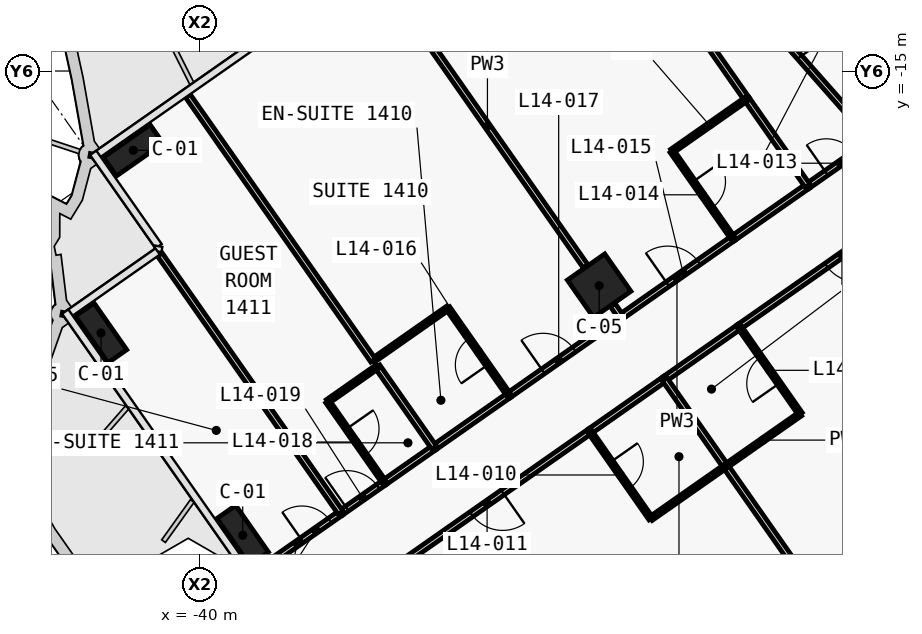
"""IFC4 building model, lengths in metres.
Left out: names, types, materials, properties, quantities, classifications, styles, units other than length and angle.
Written with IfcOpenShell. Run it as: python <this file> out.ifc"""

import sys

from ifc_helpers import new_model, si_unit, direction, frame, frame_2d, origin, origin_2d, place, context, subcontext, project, spatial, polyline, rectangle, outline, extrude, element, fill, save


model = new_model("IFC4")
c1 = context("Model", 3, precision=1e-05, world=origin(), true_north=direction((0.0, 1.0)))
c2 = subcontext(c1, "Body", "Model", "MODEL_VIEW")
j1 = project(units=[si_unit("LENGTHUNIT", "METRE"), si_unit("PLANEANGLEUNIT", "RADIAN")], contexts=[c1])
p1 = place(None, origin())
s1 = spatial("IfcSite", under=j1, at=p1, CompositionType="ELEMENT")
p2 = place(p1, origin())
s2 = spatial("IfcBuilding", under=s1, at=p2, CompositionType="ELEMENT")
p3 = place(p2, frame((0.0, 0.0, 76.1)))
s3 = spatial("IfcBuildingStorey", under=s2, at=p3, CompositionType="ELEMENT", Elevation=76.1)
p4 = place(p3, frame((-21.708, -15.2, 0.0), z_axis=(0.0, 0.0, 1.0), x_axis=(-0.573576324356, 0.819152122709, 0.0)))
e1 = element("IfcWall", 1, at=p4, inside=s3, PredefinedType="SHEAR", context=c2, shape_type="SweptSolid", body=[
    extrude(outline(polyline([(0.0, 0.5), (0.0, -0.5), (9.2, -0.5), (9.2, 0.5), (0.0, 0.5)])), origin(), (0.0, 0.0, 1.0), 3.6),
])
p5 = place(p4, frame((6.1, 0.0, 0.0)))
e2 = element("IfcOpeningElement", 2, at=p5, cuts=e1, PredefinedType="OPENING", context=c2, shape_type="SweptSolid", body=[
    extrude(rectangle(XDim=1.8, YDim=2.1, at=frame_2d((0.9, 1.05))), frame((0.0, 0.51, 0.0), z_axis=(0.0, -1.0, 0.0), x_axis=(1.0, 0.0, 0.0)), (0.0, 0.0, 1.0), 1.02),
])
p6 = place(p4, frame((1.9, 0.0, 0.0)))
e3 = element("IfcOpeningElement", 3, at=p6, cuts=e1, PredefinedType="OPENING", context=c2, shape_type="SweptSolid", body=[
    extrude(rectangle(XDim=1.8, YDim=2.1, at=frame_2d((0.9, 1.05))), frame((0.0, 0.51, 0.0), z_axis=(0.0, -1.0, 0.0), x_axis=(1.0, 0.0, 0.0)), (0.0, 0.0, 1.0), 1.02),
])
for number, where, z_axis, x_axis in (
    (4, (-41.75, -17.087, 0.0), (0.0, 0.0, 1.0), (-0.819, -0.574, 0.0)),
    (5, (-38.869, -27.216, 0.0), (0.0, 0.0, 1.0), (-0.574, 0.819, 0.0)),
    (6, (-42.597, -21.892, 0.0), (0.0, 0.0, 1.0), (-0.574, 0.819, 0.0)),
):
    element("IfcColumn", number, at=place(p3, frame(where, z_axis=z_axis, x_axis=x_axis)), inside=s3, PredefinedType="COLUMN", context=c2, shape_type="SweptSolid", body=[
        extrude(rectangle(XDim=1.5, YDim=0.6, at=origin_2d()), origin(), (0.0, 0.0, 1.0), 3.6),
    ])
p7 = place(p3, frame((-29.49, -20.649, 0.0), z_axis=(0.0, 0.0, 1.0), x_axis=(-0.819152044289, -0.573576436351, 0.0)))
e7 = element("IfcColumn", 7, at=p7, inside=s3, PredefinedType="COLUMN", context=c2, shape_type="SweptSolid", body=[
    extrude(rectangle(XDim=1.2, YDim=1.2, at=origin_2d()), origin(), (0.0, 0.0, 1.0), 3.6),
])
p8 = place(p3, frame((-24.003, -18.028, 0.0), z_axis=(0.0, 0.0, 1.0), x_axis=(0.819160859995, 0.573563846013, 0.0)))
e8 = element("IfcWall", 8, at=p8, inside=s3, PredefinedType="PARTITIONING", context=c2, shape_type="SweptSolid", body=[
    extrude(rectangle(XDim=2.098, YDim=0.15, at=frame_2d((1.049, 0.0))), origin(), (0.0, 0.0, 1.0), 3.32),
])
p9 = place(p8, frame((0.599, 0.0, 0.0)))
e9 = element("IfcOpeningElement", 9, at=p9, cuts=e8, PredefinedType="OPENING", context=c2, shape_type="SweptSolid", body=[
    extrude(rectangle(XDim=0.9, YDim=2.1, at=frame_2d((0.45, 1.05))), frame((0.0, 0.085, 0.0), z_axis=(0.0, -1.0, 0.0), x_axis=(1.0, 0.0, 0.0)), (0.0, 0.0, 1.0), 0.17),
])
p10 = place(p3, frame((-28.917, -21.469, 0.0), z_axis=(0.0, 0.0, 1.0), x_axis=(0.81917779803, 0.57353965444, 0.0)))
e10 = element("IfcWall", 10, at=p10, inside=s3, PredefinedType="PARTITIONING", context=c2, shape_type="SweptSolid", body=[
    extrude(rectangle(XDim=3.603, YDim=0.15, at=frame_2d((1.801, 0.0))), origin(), (0.0, 0.0, 1.0), 2.6),
])
p11 = place(p10, frame((1.502, 0.0, 0.0)))
e11 = element("IfcOpeningElement", 11, at=p11, cuts=e10, PredefinedType="OPENING", context=c2, shape_type="SweptSolid", body=[
    extrude(rectangle(XDim=1.0, YDim=2.1, at=frame_2d((0.5, 1.05))), frame((0.0, 0.085, 0.0), z_axis=(0.0, -1.0, 0.0), x_axis=(1.0, 0.0, 0.0)), (0.0, 0.0, 1.0), 0.17),
])
p12 = place(p3, frame((-25.969, -19.404, 0.0), z_axis=(0.0, 0.0, 1.0), x_axis=(0.819146032251, 0.573585022335, 0.0)))
e12 = element("IfcWall", 12, at=p12, inside=s3, PredefinedType="PARTITIONING", context=c2, shape_type="SweptSolid", body=[
    extrude(rectangle(XDim=2.404, YDim=0.15, at=frame_2d((1.202, 0.0))), origin(), (0.0, 0.0, 1.0), 3.32),
])
p13 = place(p3, frame((-31.866, -23.533, 0.0), z_axis=(0.0, 0.0, 1.0), x_axis=(0.819145961204, 0.573585123798, 0.0)))
e13 = element("IfcWall", 13, at=p13, inside=s3, PredefinedType="PARTITIONING", context=c2, shape_type="SweptSolid", body=[
    extrude(rectangle(XDim=3.603, YDim=0.15, at=frame_2d((1.802, 0.0))), origin(), (0.0, 0.0, 1.0), 2.6),
])
p14 = place(p13, frame((1.101, 0.0, 0.0)))
e14 = element("IfcOpeningElement", 14, at=p14, cuts=e13, PredefinedType="OPENING", context=c2, shape_type="SweptSolid", body=[
    extrude(rectangle(XDim=1.0, YDim=2.1, at=frame_2d((0.5, 1.05))), frame((0.0, 0.085, 0.0), z_axis=(0.0, -1.0, 0.0), x_axis=(1.0, 0.0, 0.0)), (0.0, 0.0, 1.0), 0.17),
])
p15 = place(p3, frame((-33.833, -24.91, 0.0), z_axis=(0.0, 0.0, 1.0), x_axis=(0.819146032251, 0.573585022335, 0.0)))
e15 = element("IfcWall", 15, at=p15, inside=s3, PredefinedType="PARTITIONING", context=c2, shape_type="SweptSolid", body=[
    extrude(rectangle(XDim=2.404, YDim=0.15, at=frame_2d((1.202, 0.0))), origin(), (0.0, 0.0, 1.0), 3.32),
])
p16 = place(p3, frame((-36.29, -26.631, 0.0), z_axis=(0.0, 0.0, 1.0), x_axis=(0.81914197737, 0.573590813132, 0.0)))
e16 = element("IfcWall", 16, at=p16, inside=s3, PredefinedType="PARTITIONING", context=c2, shape_type="SweptSolid", body=[
    extrude(rectangle(XDim=1.403, YDim=0.15, at=frame_2d((0.701, 0.0))), origin(), (0.0, 0.0, 1.0), 3.32),
])
p17 = place(p16, frame((0.202, 0.0, 0.0)))
e17 = element("IfcOpeningElement", 17, at=p17, cuts=e16, PredefinedType="OPENING", context=c2, shape_type="SweptSolid", body=[
    extrude(rectangle(XDim=1.0, YDim=2.1, at=frame_2d((0.5, 1.05))), frame((0.0, 0.085, 0.0), z_axis=(0.0, -1.0, 0.0), x_axis=(1.0, 0.0, 0.0)), (0.0, 0.0, 1.0), 0.17),
])
p18 = place(p3, frame((-35.143, -25.828, 0.0), z_axis=(0.0, 0.0, 1.0), x_axis=(0.819189013667, 0.573523634986, 0.0)))
e18 = element("IfcWall", 18, at=p18, inside=s3, PredefinedType="PARTITIONING", context=c2, shape_type="SweptSolid", body=[
    extrude(rectangle(XDim=1.604, YDim=0.15, at=frame_2d((0.802, 0.0))), origin(), (0.0, 0.0, 1.0), 3.32),
])
p19 = place(p3, frame((-38.582, -28.236, 0.0), z_axis=(0.0, 0.0, 1.0), x_axis=(0.819137759006, 0.573596837309, 0.0)))
e19 = element("IfcWall", 19, at=p19, inside=s3, PredefinedType="PARTITIONING", context=c2, shape_type="SweptSolid", body=[
    extrude(rectangle(XDim=2.802, YDim=0.15, at=frame_2d((1.401, 0.0))), origin(), (0.0, 0.0, 1.0), 2.5),
])
p20 = place(p19, frame((1.551, 0.0, 0.0)))
e20 = element("IfcOpeningElement", 20, at=p20, cuts=e19, PredefinedType="OPENING", context=c2, shape_type="SweptSolid", body=[
    extrude(rectangle(XDim=0.9, YDim=2.1, at=frame_2d((0.45, 1.05))), frame((0.0, 0.085, 0.0), z_axis=(0.0, -1.0, 0.0), x_axis=(1.0, 0.0, 0.0)), (0.0, 0.0, 1.0), 0.17),
])
p21 = place(p3, frame((-20.395, -17.943, 0.0), z_axis=(0.0, 0.0, 1.0), x_axis=(-0.819153746897, -0.573574004767, 0.0)))
e21 = element("IfcWall", 21, at=p21, inside=s3, PredefinedType="PARTITIONING", context=c2, shape_type="SweptSolid", body=[
    extrude(rectangle(XDim=6.603, YDim=0.15, at=frame_2d((3.302, 0.0))), origin(), (0.0, 0.0, 1.0), 2.6),
])
p22 = place(p21, frame((2.802, 0.0, 0.0)))
e22 = element("IfcOpeningElement", 22, at=p22, cuts=e21, PredefinedType="OPENING", context=c2, shape_type="SweptSolid", body=[
    extrude(rectangle(XDim=1.0, YDim=2.1, at=frame_2d((0.5, 1.05))), frame((0.0, 0.085, 0.0), z_axis=(0.0, -1.0, 0.0), x_axis=(1.0, 0.0, 0.0)), (0.0, 0.0, 1.0), 0.17),
])
p23 = place(p3, frame((-25.801, -21.729, 0.0), z_axis=(0.0, 0.0, 1.0), x_axis=(-0.819179439794, -0.573537309527, 0.0)))
e23 = element("IfcWall", 23, at=p23, inside=s3, PredefinedType="PARTITIONING", context=c2, shape_type="SweptSolid", body=[
    extrude(rectangle(XDim=2.404, YDim=0.15, at=frame_2d((1.202, 0.0))), origin(), (0.0, 0.0, 1.0), 2.6),
])
p24 = place(p3, frame((-29.734, -24.482, 0.0), z_axis=(0.0, 0.0, 1.0), x_axis=(-0.819153746897, -0.573574004767, 0.0)))
e24 = element("IfcWall", 24, at=p24, inside=s3, PredefinedType="PARTITIONING", context=c2, shape_type="SweptSolid", body=[
    extrude(rectangle(XDim=6.603, YDim=0.15, at=frame_2d((3.302, 0.0))), origin(), (0.0, 0.0, 1.0), 3.32),
])
p25 = place(p24, frame((2.801, 0.0, 0.0)))
e25 = element("IfcOpeningElement", 25, at=p25, cuts=e24, PredefinedType="OPENING", context=c2, shape_type="SweptSolid", body=[
    extrude(rectangle(XDim=1.0, YDim=2.1, at=frame_2d((0.5, 1.05))), frame((0.0, 0.085, 0.0), z_axis=(0.0, -1.0, 0.0), x_axis=(1.0, 0.0, 0.0)), (0.0, 0.0, 1.0), 0.17),
])
p26 = place(p3, frame((-27.767, -23.105, 0.0), z_axis=(0.0, 0.0, 1.0), x_axis=(-0.819146032251, -0.573585022335, 0.0)))
e26 = element("IfcWall", 26, at=p26, inside=s3, PredefinedType="PARTITIONING", context=c2, shape_type="SweptSolid", body=[
    extrude(rectangle(XDim=2.404, YDim=0.15, at=frame_2d((1.202, 0.0))), origin(), (0.0, 0.0, 1.0), 2.6),
])
p27 = place(p3, frame((-22.284, -16.827, 0.0), z_axis=(0.0, 0.0, 1.0), x_axis=(-0.661545117561, 0.749905365651, 0.0)))
e27 = element("IfcWall", 27, at=p27, inside=s3, PredefinedType="PARTITIONING", context=c2, shape_type="SweptSolid", body=[
    extrude(rectangle(XDim=6.543, YDim=0.15, at=frame_2d((3.271, 0.0))), origin(), (0.0, 0.0, 1.0), 2.6),
])
p28 = place(p3, frame((-25.606, -15.734, 0.0), z_axis=(0.0, 0.0, 1.0), x_axis=(-0.573576058406, 0.819152308929, 0.0)))
e28 = element("IfcWall", 28, at=p28, inside=s3, PredefinedType="PARTITIONING", context=c2, shape_type="SweptSolid", body=[
    extrude(rectangle(XDim=8.501, YDim=0.15, at=frame_2d((4.25, 0.0))), origin(), (0.0, 0.0, 1.0), 2.6),
])
p29 = place(p3, frame((-24.001, -18.026, 0.0), z_axis=(0.0, 0.0, 1.0), x_axis=(-0.573596837309, 0.819137759006, 0.0)))
e29 = element("IfcWall", 29, at=p29, inside=s3, PredefinedType="PARTITIONING", context=c2, shape_type="SweptSolid", body=[
    extrude(rectangle(XDim=2.802, YDim=0.15, at=frame_2d((1.401, 0.0))), origin(), (0.0, 0.0, 1.0), 2.6),
])
p30 = place(p3, frame((-25.608, -15.732, 0.0), z_axis=(0.0, 0.0, 1.0), x_axis=(-0.819107643868, -0.573639841501, 0.0)))
e30 = element("IfcWall", 30, at=p30, inside=s3, PredefinedType="PARTITIONING", context=c2, shape_type="SweptSolid", body=[
    extrude(rectangle(XDim=2.4, YDim=0.12, at=frame_2d((1.2, 0.0))), origin(), (0.0, 0.0, 1.0), 3.32),
])
p31 = place(p3, frame((-27.574, -17.11, 0.0), z_axis=(0.0, 0.0, 1.0), x_axis=(0.573591086599, -0.819141785879, 0.0)))
e31 = element("IfcWall", 31, at=p31, inside=s3, PredefinedType="PARTITIONING", context=c2, shape_type="SweptSolid", body=[
    extrude(rectangle(XDim=2.8, YDim=0.12, at=frame_2d((1.4, 0.0))), origin(), (0.0, 0.0, 1.0), 2.6),
])
p32 = place(p31, frame((0.975, 0.0, 0.0)))
e32 = element("IfcOpeningElement", 32, at=p32, cuts=e31, PredefinedType="OPENING", context=c2, shape_type="SweptSolid", body=[
    extrude(rectangle(XDim=0.85, YDim=2.05, at=frame_2d((0.425, 1.025))), frame((0.0, 0.07, 0.0), z_axis=(0.0, -1.0, 0.0), x_axis=(1.0, 0.0, 0.0)), (0.0, 0.0, 1.0), 0.14),
])
p33 = place(p3, frame((-28.916, -21.468, 0.0), z_axis=(0.0, 0.0, 1.0), x_axis=(-0.572944929411, 0.819593867633, 0.0)))
e33 = element("IfcWall", 33, at=p33, inside=s3, PredefinedType="PARTITIONING", context=c2, shape_type="SweptSolid", body=[
    extrude(rectangle(XDim=0.38, YDim=0.15, at=frame_2d((0.19, 0.0))), origin(), (0.0, 0.0, 1.0), 2.6),
])
p34 = place(p3, frame((-29.845, -20.141, 0.0), z_axis=(0.0, 0.0, 1.0), x_axis=(-0.573558725113, 0.819164445546, 0.0)))
e34 = element("IfcWall", 34, at=p34, inside=s3, PredefinedType="PARTITIONING", context=c2, shape_type="SweptSolid", body=[
    extrude(rectangle(XDim=9.01, YDim=0.15, at=frame_2d((4.505, 0.0))), origin(), (0.0, 0.0, 1.0), 2.6),
])
p35 = place(p3, frame((-31.864, -23.532, 0.0), z_axis=(0.0, 0.0, 1.0), x_axis=(-0.573550118428, 0.819170471667, 0.0)))
e35 = element("IfcWall", 35, at=p35, inside=s3, PredefinedType="PARTITIONING", context=c2, shape_type="SweptSolid", body=[
    extrude(rectangle(XDim=2.8, YDim=0.12, at=frame_2d((1.4, 0.0))), origin(), (0.0, 0.0, 1.0), 2.6),
])
p36 = place(p35, frame((0.975, 0.0, 0.0)))
e36 = element("IfcOpeningElement", 36, at=p36, cuts=e35, PredefinedType="OPENING", context=c2, shape_type="SweptSolid", body=[
    extrude(rectangle(XDim=0.85, YDim=2.05, at=frame_2d((0.425, 1.025))), frame((0.0, 0.07, 0.0), z_axis=(0.0, -1.0, 0.0), x_axis=(1.0, 0.0, 0.0)), (0.0, 0.0, 1.0), 0.14),
])
p37 = place(p3, frame((-33.471, -21.238, 0.0), z_axis=(0.0, 0.0, 1.0), x_axis=(-0.819141114317, -0.573592045652, 0.0)))
e37 = element("IfcWall", 37, at=p37, inside=s3, PredefinedType="PARTITIONING", context=c2, shape_type="SweptSolid", body=[
    extrude(rectangle(XDim=2.4, YDim=0.12, at=frame_2d((1.2, 0.0))), origin(), (0.0, 0.0, 1.0), 3.32),
])
p38 = place(p3, frame((-35.438, -22.615, 0.0), z_axis=(0.0, 0.0, 1.0), x_axis=(-0.573560662175, 0.81916308926, 0.0)))
e38 = element("IfcWall", 38, at=p38, inside=s3, PredefinedType="PARTITIONING", context=c2, shape_type="SweptSolid", body=[
    extrude(rectangle(XDim=8.499, YDim=0.15, at=frame_2d((4.25, 0.0))), origin(), (0.0, 0.0, 1.0), 2.5),
])
p39 = place(p3, frame((-33.831, -24.909, 0.0), z_axis=(0.0, 0.0, 1.0), x_axis=(-0.573544201094, 0.819174614714, 0.0)))
e39 = element("IfcWall", 39, at=p39, inside=s3, PredefinedType="PARTITIONING", context=c2, shape_type="SweptSolid", body=[
    extrude(rectangle(XDim=2.602, YDim=0.15, at=frame_2d((1.301, 0.0))), origin(), (0.0, 0.0, 1.0), 2.6),
])
p40 = place(p3, frame((-35.323, -22.779, 0.0), z_axis=(0.0, 0.0, 1.0), x_axis=(-0.819131543282, -0.57360571371, 0.0)))
e40 = element("IfcWall", 40, at=p40, inside=s3, PredefinedType="PARTITIONING", context=c2, shape_type="SweptSolid", body=[
    extrude(rectangle(XDim=1.6, YDim=0.12, at=frame_2d((0.8, 0.0))), origin(), (0.0, 0.0, 1.0), 3.32),
])
p41 = place(p3, frame((-36.634, -23.698, 0.0), z_axis=(0.0, 0.0, 1.0), x_axis=(0.573582085028, -0.819148089014, 0.0)))
e41 = element("IfcWall", 41, at=p41, inside=s3, PredefinedType="PARTITIONING", context=c2, shape_type="SweptSolid", body=[
    extrude(rectangle(XDim=2.6, YDim=0.12, at=frame_2d((1.3, 0.0))), origin(), (0.0, 0.0, 1.0), 2.6),
])
p42 = place(p41, frame((0.875, 0.0, 0.0)))
e42 = element("IfcOpeningElement", 42, at=p42, cuts=e41, PredefinedType="OPENING", context=c2, shape_type="SweptSolid", body=[
    extrude(rectangle(XDim=0.85, YDim=2.05, at=frame_2d((0.425, 1.025))), frame((0.0, 0.07, 0.0), z_axis=(0.0, -1.0, 0.0), x_axis=(1.0, 0.0, 0.0)), (0.0, 0.0, 1.0), 0.14),
])
p43 = place(p3, frame((-36.288, -26.63, 0.0), z_axis=(0.0, 0.0, 1.0), x_axis=(-0.573555124968, 0.819166966267, 0.0)))
e43 = element("IfcWall", 43, at=p43, inside=s3, PredefinedType="PARTITIONING", context=c2, shape_type="SweptSolid", body=[
    extrude(rectangle(XDim=8.3, YDim=0.15, at=frame_2d((4.15, 0.0))), origin(), (0.0, 0.0, 1.0), 2.6),
])
p44 = place(p3, frame((-26.162, -25.401, 0.0), z_axis=(0.0, 0.0, 1.0), x_axis=(0.819155442668, 0.573571582932, 0.0)))
e44 = element("IfcWall", 44, at=p44, inside=s3, PredefinedType="PARTITIONING", context=c2, shape_type="SweptSolid", body=[
    extrude(rectangle(XDim=2.4, YDim=0.12, at=frame_2d((1.2, 0.0))), origin(), (0.0, 0.0, 1.0), 2.6),
])
p45 = place(p3, frame((-24.196, -24.023, 0.0), z_axis=(0.0, 0.0, 1.0), x_axis=(-0.573608623498, 0.819129505664, 0.0)))
e45 = element("IfcWall", 45, at=p45, inside=s3, PredefinedType="PARTITIONING", context=c2, shape_type="SweptSolid", body=[
    extrude(rectangle(XDim=2.8, YDim=0.12, at=frame_2d((1.4, 0.0))), origin(), (0.0, 0.0, 1.0), 3.32),
])
p46 = place(p45, frame((0.975, 0.0, 0.0)))
e46 = element("IfcOpeningElement", 46, at=p46, cuts=e45, PredefinedType="OPENING", context=c2, shape_type="SweptSolid", body=[
    extrude(rectangle(XDim=0.85, YDim=2.05, at=frame_2d((0.425, 1.025))), frame((0.0, 0.07, 0.0), z_axis=(0.0, -1.0, 0.0), x_axis=(1.0, 0.0, 0.0)), (0.0, 0.0, 1.0), 0.14),
])
p47 = place(p3, frame((-23.966, -28.537, 0.0), z_axis=(0.0, 0.0, 1.0), x_axis=(-0.573594994199, 0.819139049631, 0.0)))
e47 = element("IfcWall", 47, at=p47, inside=s3, PredefinedType="PARTITIONING", context=c2, shape_type="SweptSolid", body=[
    extrude(rectangle(XDim=3.829, YDim=0.15, at=frame_2d((1.915, 0.0))), origin(), (0.0, 0.0, 1.0), 2.6),
])
p48 = place(p3, frame((-26.163, -25.4, 0.0), z_axis=(0.0, 0.0, 1.0), x_axis=(-0.573608623498, 0.819129505664, 0.0)))
e48 = element("IfcWall", 48, at=p48, inside=s3, PredefinedType="PARTITIONING", context=c2, shape_type="SweptSolid", body=[
    extrude(rectangle(XDim=2.8, YDim=0.15, at=frame_2d((1.4, 0.0))), origin(), (0.0, 0.0, 1.0), 2.6),
])
p49 = place(p3, frame((-29.736, -24.483, 0.0), z_axis=(0.0, 0.0, 1.0), x_axis=(0.573608623498, -0.819129505664, 0.0)))
e49 = element("IfcWall", 49, at=p49, inside=s3, PredefinedType="PARTITIONING", context=c2, shape_type="SweptSolid", body=[
    extrude(rectangle(XDim=2.8, YDim=0.12, at=frame_2d((1.4, 0.0))), origin(), (0.0, 0.0, 1.0), 3.32),
])
p50 = place(p49, frame((0.975, 0.0, 0.0)))
e50 = element("IfcOpeningElement", 50, at=p50, cuts=e49, PredefinedType="OPENING", context=c2, shape_type="SweptSolid", body=[
    extrude(rectangle(XDim=0.85, YDim=2.05, at=frame_2d((0.425, 1.025))), frame((0.0, 0.07, 0.0), z_axis=(0.0, -1.0, 0.0), x_axis=(1.0, 0.0, 0.0)), (0.0, 0.0, 1.0), 0.14),
])
p51 = place(p3, frame((-28.128, -26.777, 0.0), z_axis=(0.0, 0.0, 1.0), x_axis=(0.819188907105, 0.573523787192, 0.0)))
e51 = element("IfcWall", 51, at=p51, inside=s3, PredefinedType="PARTITIONING", context=c2, shape_type="SweptSolid", body=[
    extrude(rectangle(XDim=2.4, YDim=0.12, at=frame_2d((1.2, 0.0))), origin(), (0.0, 0.0, 1.0), 2.6),
])
p52 = place(p46, origin())
e52 = element("IfcDoor", 52, at=p52, inside=s3, OperationType="SINGLE_SWING_RIGHT", PredefinedType="DOOR", context=c2, shape_type="SweptSolid", body=[
    extrude(rectangle(XDim=0.85, YDim=2.05, at=frame_2d((0.425, 1.025))), frame((0.0, 0.025, 0.0), z_axis=(0.0, -1.0, 0.0), x_axis=(1.0, 0.0, 0.0)), (0.0, 0.0, 1.0), 0.05),
])
fill(e46, e52)
p53 = place(p22, origin())
e53 = element("IfcDoor", 53, at=p53, inside=s3, OperationType="SINGLE_SWING_RIGHT", PredefinedType="DOOR", context=c2, shape_type="SweptSolid", body=[
    extrude(rectangle(XDim=1.0, YDim=2.1, at=frame_2d((0.5, 1.05))), frame((0.0, 0.025, 0.0), z_axis=(0.0, -1.0, 0.0), x_axis=(1.0, 0.0, 0.0)), (0.0, 0.0, 1.0), 0.05),
])
fill(e22, e53)
p54 = place(p50, origin())
e54 = element("IfcDoor", 54, at=p54, inside=s3, OperationType="SINGLE_SWING_RIGHT", PredefinedType="DOOR", context=c2, shape_type="SweptSolid", body=[
    extrude(rectangle(XDim=0.85, YDim=2.05, at=frame_2d((0.425, 1.025))), frame((0.0, 0.025, 0.0), z_axis=(0.0, -1.0, 0.0), x_axis=(1.0, 0.0, 0.0)), (0.0, 0.0, 1.0), 0.05),
])
fill(e50, e54)
p55 = place(p25, origin())
e55 = element("IfcDoor", 55, at=p55, inside=s3, OperationType="SINGLE_SWING_RIGHT", PredefinedType="DOOR", context=c2, shape_type="SweptSolid", body=[
    extrude(rectangle(XDim=1.0, YDim=2.1, at=frame_2d((0.5, 1.05))), frame((0.0, 0.025, 0.0), z_axis=(0.0, -1.0, 0.0), x_axis=(1.0, 0.0, 0.0)), (0.0, 0.0, 1.0), 0.05),
])
fill(e25, e55)
p56 = place(p9, origin())
e56 = element("IfcDoor", 56, at=p56, inside=s3, OperationType="SINGLE_SWING_LEFT", PredefinedType="DOOR", context=c2, shape_type="SweptSolid", body=[
    extrude(rectangle(XDim=0.9, YDim=2.1, at=frame_2d((0.45, 1.05))), frame((0.0, 0.025, 0.0), z_axis=(0.0, -1.0, 0.0), x_axis=(1.0, 0.0, 0.0)), (0.0, 0.0, 1.0), 0.05),
])
fill(e9, e56)
p57 = place(p32, origin())
e57 = element("IfcDoor", 57, at=p57, inside=s3, OperationType="SINGLE_SWING_RIGHT", PredefinedType="DOOR", context=c2, shape_type="SweptSolid", body=[
    extrude(rectangle(XDim=0.85, YDim=2.05, at=frame_2d((0.425, 1.025))), frame((0.0, 0.025, 0.0), z_axis=(0.0, -1.0, 0.0), x_axis=(1.0, 0.0, 0.0)), (0.0, 0.0, 1.0), 0.05),
])
fill(e32, e57)
p58 = place(p11, origin())
e58 = element("IfcDoor", 58, at=p58, inside=s3, OperationType="SINGLE_SWING_LEFT", PredefinedType="DOOR", context=c2, shape_type="SweptSolid", body=[
    extrude(rectangle(XDim=1.0, YDim=2.1, at=frame_2d((0.5, 1.05))), frame((0.0, 0.025, 0.0), z_axis=(0.0, -1.0, 0.0), x_axis=(1.0, 0.0, 0.0)), (0.0, 0.0, 1.0), 0.05),
])
fill(e11, e58)
p59 = place(p36, origin())
e59 = element("IfcDoor", 59, at=p59, inside=s3, OperationType="SINGLE_SWING_RIGHT", PredefinedType="DOOR", context=c2, shape_type="SweptSolid", body=[
    extrude(rectangle(XDim=0.85, YDim=2.05, at=frame_2d((0.425, 1.025))), frame((0.0, 0.025, 0.0), z_axis=(0.0, -1.0, 0.0), x_axis=(1.0, 0.0, 0.0)), (0.0, 0.0, 1.0), 0.05),
])
fill(e36, e59)
p60 = place(p14, origin())
e60 = element("IfcDoor", 60, at=p60, inside=s3, OperationType="SINGLE_SWING_LEFT", PredefinedType="DOOR", context=c2, shape_type="SweptSolid", body=[
    extrude(rectangle(XDim=1.0, YDim=2.1, at=frame_2d((0.5, 1.05))), frame((0.0, 0.025, 0.0), z_axis=(0.0, -1.0, 0.0), x_axis=(1.0, 0.0, 0.0)), (0.0, 0.0, 1.0), 0.05),
])
fill(e14, e60)
p61 = place(p42, origin())
e61 = element("IfcDoor", 61, at=p61, inside=s3, OperationType="SINGLE_SWING_LEFT", PredefinedType="DOOR", context=c2, shape_type="SweptSolid", body=[
    extrude(rectangle(XDim=0.85, YDim=2.05, at=frame_2d((0.425, 1.025))), frame((0.0, 0.025, 0.0), z_axis=(0.0, -1.0, 0.0), x_axis=(1.0, 0.0, 0.0)), (0.0, 0.0, 1.0), 0.05),
])
fill(e42, e61)
p62 = place(p17, origin())
e62 = element("IfcDoor", 62, at=p62, inside=s3, OperationType="SINGLE_SWING_RIGHT", PredefinedType="DOOR", context=c2, shape_type="SweptSolid", body=[
    extrude(rectangle(XDim=1.0, YDim=2.1, at=frame_2d((0.5, 1.05))), frame((0.0, 0.025, 0.0), z_axis=(0.0, -1.0, 0.0), x_axis=(1.0, 0.0, 0.0)), (0.0, 0.0, 1.0), 0.05),
])
fill(e17, e62)
p63 = place(p20, origin())
e63 = element("IfcDoor", 63, at=p63, inside=s3, OperationType="SINGLE_SWING_RIGHT", PredefinedType="DOOR", context=c2, shape_type="SweptSolid", body=[
    extrude(rectangle(XDim=0.9, YDim=2.1, at=frame_2d((0.45, 1.05))), frame((0.0, 0.025, 0.0), z_axis=(0.0, -1.0, 0.0), x_axis=(1.0, 0.0, 0.0)), (0.0, 0.0, 1.0), 0.05),
])
fill(e20, e63)
save(model, sys.argv[1])
